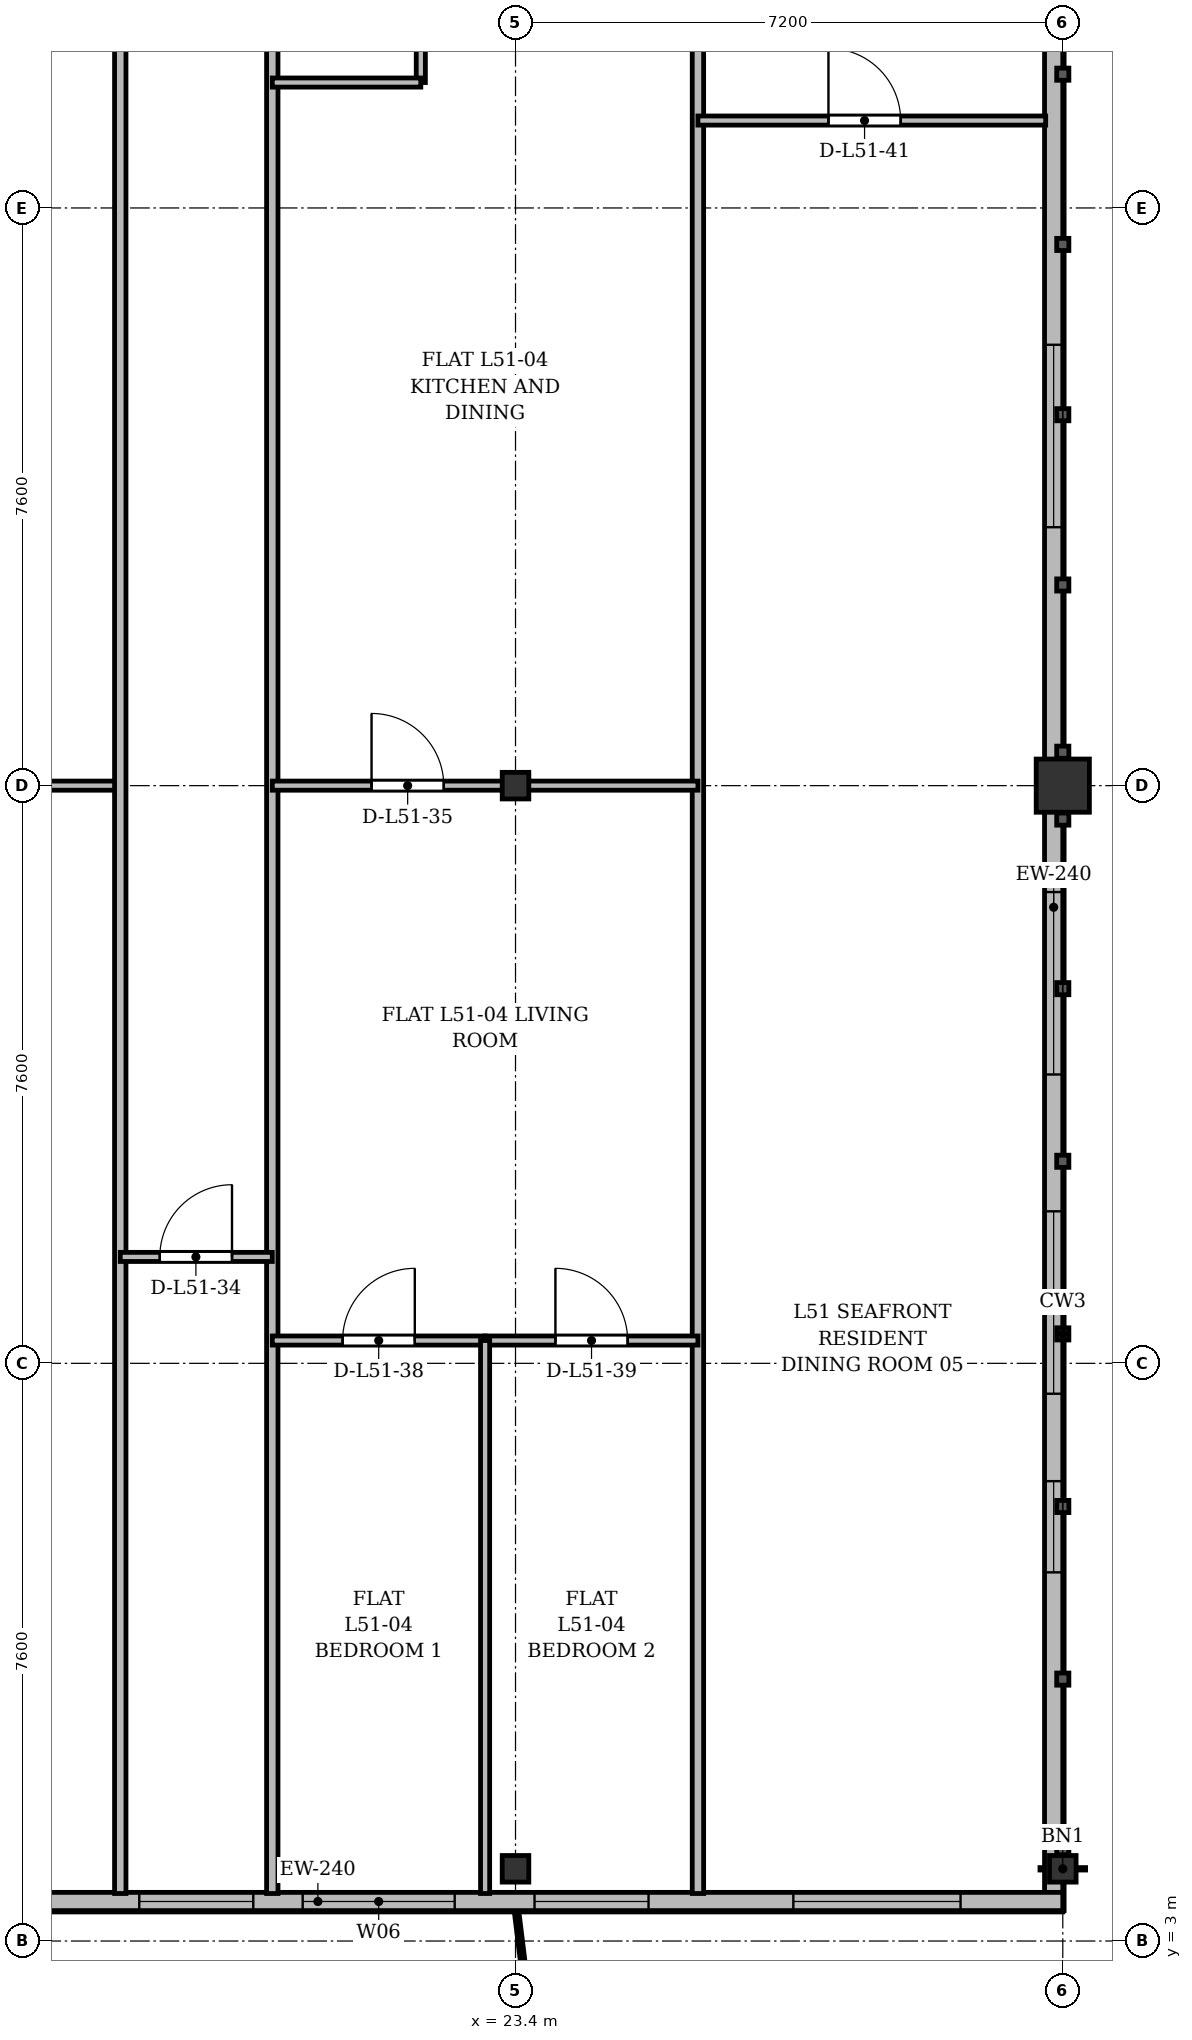
"""IFC4 building model, lengths in metres.
Left out: names, types, materials, properties, quantities, classifications, styles, units other than length and angle.
Written with IfcOpenShell. Run it as: python <this file> out.ifc"""

import sys

from ifc_helpers import new_model, si_unit, direction, frame, frame_2d, origin, origin_2d, place, context, subcontext, project, spatial, rectangle, i_section, extrude, source, transform, mapped, element, fill, save


model = new_model("IFC4")
c1 = context("Model", 3, precision=1e-05, world=origin(), true_north=direction((0.0, 1.0)))
c2 = subcontext(c1, "Body", "Model", "MODEL_VIEW")
j1 = project(units=[si_unit("LENGTHUNIT", "METRE"), si_unit("PLANEANGLEUNIT", "RADIAN")], contexts=[c1])
p1 = place(None, origin())
s1 = spatial("IfcSite", under=j1, at=p1, CompositionType="ELEMENT")
p2 = place(p1, origin())
s2 = spatial("IfcBuilding", under=s1, at=p2, CompositionType="ELEMENT")
p3 = place(p2, frame((0.0, 0.0, 197.7)))
s3 = spatial("IfcBuildingStorey", under=s2, at=p3, CompositionType="ELEMENT", Elevation=197.7)
m1 = source(origin(), c2, "Body", "SweptSolid", [
    extrude(i_section(OverallWidth=0.35, OverallDepth=0.35, WebThickness=0.018, FlangeThickness=0.028, at=origin_2d()), origin(), (0.0, 0.0, 1.0), 3.6),
])
for number, where, z_axis, x_axis in (
    (1, (23.4, 3.95, 0.0), (0.0, 0.0, 1.0), (1.0, 0.0, 0.0)),
    (2, (23.4, 18.2, 0.0), (0.0, 0.0, 1.0), (1.0, 0.0, 0.0)),
    (3, (30.6, 3.95, 0.0), (0.0, 0.0, 1.0), (1.0, 0.0, 0.0)),
):
    element("IfcColumn", number, at=place(p3, frame(where, z_axis=z_axis, x_axis=x_axis)), inside=s3, PredefinedType="COLUMN", context=c2, shape_type="MappedRepresentation", body=[
        mapped(m1, transform((0.0, 0.0, 0.0), x_axis=(1.0, 0.0, 0.0), y_axis=(0.0, 1.0, 0.0), z_axis=(0.0, 0.0, 1.0), scale=1.0)),
    ])
m2 = source(origin(), c2, "Body", "SweptSolid", [
    extrude(rectangle(XDim=0.7, YDim=0.7, at=origin_2d()), origin(), (0.0, 0.0, 1.0), 3.6),
])
p4 = place(p3, frame((30.6, 18.2, 0.0), z_axis=(0.0, 0.0, 1.0), x_axis=(1.0, 0.0, 0.0)))
e4 = element("IfcColumn", 4, at=p4, inside=s3, PredefinedType="COLUMN", context=c2, shape_type="MappedRepresentation", body=[
    mapped(m2, transform((0.0, 0.0, 0.0), x_axis=(1.0, 0.0, 0.0), y_axis=(0.0, 1.0, 0.0), z_axis=(0.0, 0.0, 1.0), scale=1.0)),
])
p5 = place(p3, frame((30.48, 29.8, 0.0), z_axis=(0.0, 0.0, 1.0), x_axis=(0.0, -1.0, 0.0)))
e5 = element("IfcWall", 5, at=p5, inside=s3, PredefinedType="SOLIDWALL", context=c2, shape_type="SweptSolid", body=[
    extrude(rectangle(XDim=26.4, YDim=0.24, at=frame_2d((13.2, 0.0))), origin(), (0.0, 0.0, 1.0), 2.86),
])
p6 = place(p5, frame((20.75, 0.0, 0.92)))
e6 = element("IfcOpeningElement", 6, at=p6, cuts=e5, PredefinedType="OPENING", context=c2, shape_type="SweptSolid", body=[
    extrude(rectangle(XDim=1.2, YDim=1.65, at=frame_2d((0.6, 0.825))), frame((0.0, 0.13, 0.0), z_axis=(0.0, -1.0, 0.0), x_axis=(1.0, 0.0, 0.0)), (0.0, 0.0, 1.0), 0.26),
])
p7 = place(p5, frame((17.2, 0.0, 0.92)))
e7 = element("IfcOpeningElement", 7, at=p7, cuts=e5, PredefinedType="OPENING", context=c2, shape_type="SweptSolid", body=[
    extrude(rectangle(XDim=2.4, YDim=1.84, at=frame_2d((1.2, 0.92))), frame((0.0, 0.13, 0.0), z_axis=(0.0, -1.0, 0.0), x_axis=(1.0, 0.0, 0.0)), (0.0, 0.0, 1.0), 0.26),
])
p8 = place(p5, frame((13.0, 0.0, 0.92)))
e8 = element("IfcOpeningElement", 8, at=p8, cuts=e5, PredefinedType="OPENING", context=c2, shape_type="SweptSolid", body=[
    extrude(rectangle(XDim=2.4, YDim=1.84, at=frame_2d((1.2, 0.92))), frame((0.0, 0.13, 0.0), z_axis=(0.0, -1.0, 0.0), x_axis=(1.0, 0.0, 0.0)), (0.0, 0.0, 1.0), 0.26),
])
p9 = place(p5, frame((5.8, 0.0, 0.92)))
e9 = element("IfcOpeningElement", 9, at=p9, cuts=e5, PredefinedType="OPENING", context=c2, shape_type="SweptSolid", body=[
    extrude(rectangle(XDim=2.4, YDim=1.84, at=frame_2d((1.2, 0.92))), frame((0.0, 0.13, 0.0), z_axis=(0.0, -1.0, 0.0), x_axis=(1.0, 0.0, 0.0)), (0.0, 0.0, 1.0), 0.26),
])
p10 = place(p3, frame((30.6, 3.52, 0.0), z_axis=(0.0, 0.0, 1.0), x_axis=(-1.0, 0.0, 0.0)))
e10 = element("IfcWall", 10, at=p10, inside=s3, PredefinedType="SOLIDWALL", context=c2, shape_type="SweptSolid", body=[
    extrude(rectangle(XDim=19.6, YDim=0.24, at=frame_2d((9.8, 0.0))), origin(), (0.0, 0.0, 1.0), 3.36),
])
p11 = place(p10, frame((1.345, 0.0, 0.9)))
e11 = element("IfcOpeningElement", 11, at=p11, cuts=e10, PredefinedType="OPENING", context=c2, shape_type="SweptSolid", body=[
    extrude(rectangle(XDim=2.2, YDim=1.8, at=frame_2d((1.1, 0.9))), frame((0.0, 0.13, 0.0), z_axis=(0.0, -1.0, 0.0), x_axis=(1.0, 0.0, 0.0)), (0.0, 0.0, 1.0), 0.26),
])
p12 = place(p10, frame((5.45, 0.0, 0.9)))
e12 = element("IfcOpeningElement", 12, at=p12, cuts=e10, PredefinedType="OPENING", context=c2, shape_type="SweptSolid", body=[
    extrude(rectangle(XDim=1.5, YDim=1.75, at=frame_2d((0.75, 0.875))), frame((0.0, 0.13, 0.0), z_axis=(0.0, -1.0, 0.0), x_axis=(1.0, 0.0, 0.0)), (0.0, 0.0, 1.0), 0.26),
])
p13 = place(p10, frame((8.0, 0.0, 0.9)))
e13 = element("IfcOpeningElement", 13, at=p13, cuts=e10, PredefinedType="OPENING", context=c2, shape_type="SweptSolid", body=[
    extrude(rectangle(XDim=2.0, YDim=1.95, at=frame_2d((1.0, 0.975))), frame((0.0, 0.13, 0.0), z_axis=(0.0, -1.0, 0.0), x_axis=(1.0, 0.0, 0.0)), (0.0, 0.0, 1.0), 0.26),
])
p14 = place(p10, frame((10.65, 0.0, 0.9)))
e14 = element("IfcOpeningElement", 14, at=p14, cuts=e10, PredefinedType="OPENING", context=c2, shape_type="SweptSolid", body=[
    extrude(rectangle(XDim=1.5, YDim=1.75, at=frame_2d((0.75, 0.875))), frame((0.0, 0.13, 0.0), z_axis=(0.0, -1.0, 0.0), x_axis=(1.0, 0.0, 0.0)), (0.0, 0.0, 1.0), 0.26),
])
p15 = place(p10, frame((14.3, 0.0, 0.9)))
e15 = element("IfcOpeningElement", 15, at=p15, cuts=e10, PredefinedType="OPENING", context=c2, shape_type="SweptSolid", body=[
    extrude(rectangle(XDim=1.8, YDim=1.8, at=frame_2d((0.9, 0.9))), frame((0.0, 0.13, 0.0), z_axis=(0.0, -1.0, 0.0), x_axis=(1.0, 0.0, 0.0)), (0.0, 0.0, 1.0), 0.26),
])
p16 = place(p10, frame((18.305, 0.0, 0.9)))
e16 = element("IfcOpeningElement", 16, at=p16, cuts=e10, PredefinedType="OPENING", context=c2, shape_type="SweptSolid", body=[
    extrude(rectangle(XDim=0.9, YDim=1.65, at=frame_2d((0.45, 0.825))), frame((0.0, 0.13, 0.0), z_axis=(0.0, -1.0, 0.0), x_axis=(1.0, 0.0, 0.0)), (0.0, 0.0, 1.0), 0.26),
])
p17 = place(p3, frame((25.8, 3.625, 0.0), z_axis=(0.0, 0.0, 1.0), x_axis=(0.0, 1.0, 0.0)))
e17 = element("IfcWall", 17, at=p17, inside=s3, PredefinedType="PARTITIONING", context=c2, shape_type="SweptSolid", body=[
    extrude(rectangle(XDim=27.175, YDim=0.15, at=frame_2d((13.587, 0.0))), origin(), (0.0, 0.0, 1.0), 2.91),
])
p18 = place(p3, frame((12.6, 18.2, 0.0), z_axis=(0.0, 0.0, 1.0), x_axis=(1.0, 0.0, 0.0)))
e18 = element("IfcWall", 18, at=p18, inside=s3, PredefinedType="PARTITIONING", context=c2, shape_type="SweptSolid", body=[
    extrude(rectangle(XDim=5.6, YDim=0.12, at=frame_2d((2.8, 0.0))), origin(), (0.0, 0.0, 1.0), 2.91),
])
p19 = place(p18, frame((0.936, 0.0, 0.0)))
e19 = element("IfcOpeningElement", 19, at=p19, cuts=e18, PredefinedType="OPENING", context=c2, shape_type="SweptSolid", body=[
    extrude(rectangle(XDim=0.95, YDim=2.15, at=frame_2d((0.475, 1.075))), frame((0.0, 0.07, 0.0), z_axis=(0.0, -1.0, 0.0), x_axis=(1.0, 0.0, 0.0)), (0.0, 0.0, 1.0), 0.14),
])
for number, where, z_axis, x_axis in (
    (20, (18.2, 3.625, 0.0), (0.0, 0.0, 1.0), (0.0, 1.0, 0.0)),
    (21, (20.2, 3.625, 0.0), (0.0, 0.0, 1.0), (0.0, 1.0, 0.0)),
):
    element("IfcWall", number, at=place(p3, frame(where, z_axis=z_axis, x_axis=x_axis)), inside=s3, PredefinedType="PARTITIONING", context=c2, shape_type="SweptSolid", body=[
        extrude(rectangle(XDim=27.175, YDim=0.15, at=frame_2d((13.587, 0.0))), origin(), (0.0, 0.0, 1.0), 2.91),
    ])
p20 = place(p3, frame((18.2, 12.0, 0.0), z_axis=(0.0, 0.0, 1.0), x_axis=(1.0, 0.0, 0.0)))
e22 = element("IfcWall", 22, at=p20, inside=s3, PredefinedType="PARTITIONING", context=c2, shape_type="SweptSolid", body=[
    extrude(rectangle(XDim=2.0, YDim=0.12, at=frame_2d((1.0, 0.0))), origin(), (0.0, 0.0, 1.0), 3.36),
])
p21 = place(p20, frame((0.52, 0.0, 0.0)))
e23 = element("IfcOpeningElement", 23, at=p21, cuts=e22, PredefinedType="OPENING", context=c2, shape_type="SweptSolid", body=[
    extrude(rectangle(XDim=0.95, YDim=2.15, at=frame_2d((0.475, 1.075))), frame((0.0, 0.07, 0.0), z_axis=(0.0, -1.0, 0.0), x_axis=(1.0, 0.0, 0.0)), (0.0, 0.0, 1.0), 0.14),
])
p22 = place(p3, frame((20.2, 18.2, 0.0), z_axis=(0.0, 0.0, 1.0), x_axis=(1.0, 0.0, 0.0)))
e24 = element("IfcWall", 24, at=p22, inside=s3, PredefinedType="PARTITIONING", context=c2, shape_type="SweptSolid", body=[
    extrude(rectangle(XDim=5.6, YDim=0.12, at=frame_2d((2.8, 0.0))), origin(), (0.0, 0.0, 1.0), 2.91),
])
p23 = place(p22, frame((1.306, 0.0, 0.0)))
e25 = element("IfcOpeningElement", 25, at=p23, cuts=e24, PredefinedType="OPENING", context=c2, shape_type="SweptSolid", body=[
    extrude(rectangle(XDim=0.95, YDim=2.15, at=frame_2d((0.475, 1.075))), frame((0.0, 0.07, 0.0), z_axis=(0.0, -1.0, 0.0), x_axis=(1.0, 0.0, 0.0)), (0.0, 0.0, 1.0), 0.14),
])
p24 = place(p3, frame((22.154, 27.45, 0.0), z_axis=(0.0, 0.0, 1.0), x_axis=(0.0, 1.0, 0.0)))
e26 = element("IfcWall", 26, at=p24, inside=s3, PredefinedType="PARTITIONING", context=c2, shape_type="SweptSolid", body=[
    extrude(rectangle(XDim=3.35, YDim=0.12, at=frame_2d((1.675, 0.0))), origin(), (0.0, 0.0, 1.0), 3.36),
])
p25 = place(p24, frame((0.8, 0.0, 0.0)))
e27 = element("IfcOpeningElement", 27, at=p25, cuts=e26, PredefinedType="OPENING", context=c2, shape_type="SweptSolid", body=[
    extrude(rectangle(XDim=0.85, YDim=2.1, at=frame_2d((0.425, 1.05))), frame((0.0, 0.07, 0.0), z_axis=(0.0, -1.0, 0.0), x_axis=(1.0, 0.0, 0.0)), (0.0, 0.0, 1.0), 0.14),
])
p26 = place(p3, frame((20.2, 27.45, 0.0), z_axis=(0.0, 0.0, 1.0), x_axis=(1.0, 0.0, 0.0)))
e28 = element("IfcWall", 28, at=p26, inside=s3, PredefinedType="PARTITIONING", context=c2, shape_type="SweptSolid", body=[
    extrude(rectangle(XDim=1.954, YDim=0.12, at=frame_2d((0.977, 0.0))), origin(), (0.0, 0.0, 1.0), 3.36),
])
p27 = place(p3, frame((20.2, 10.9, 0.0), z_axis=(0.0, 0.0, 1.0), x_axis=(1.0, 0.0, 0.0)))
e29 = element("IfcWall", 29, at=p27, inside=s3, PredefinedType="PARTITIONING", context=c2, shape_type="SweptSolid", body=[
    extrude(rectangle(XDim=2.8, YDim=0.12, at=frame_2d((1.4, 0.0))), origin(), (0.0, 0.0, 1.0), 3.06),
])
p28 = place(p27, frame((0.925, 0.0, 0.0)))
e30 = element("IfcOpeningElement", 30, at=p28, cuts=e29, PredefinedType="OPENING", context=c2, shape_type="SweptSolid", body=[
    extrude(rectangle(XDim=0.95, YDim=2.15, at=frame_2d((0.475, 1.075))), frame((0.0, 0.07, 0.0), z_axis=(0.0, -1.0, 0.0), x_axis=(1.0, 0.0, 0.0)), (0.0, 0.0, 1.0), 0.14),
])
p29 = place(p3, frame((23.0, 10.9, 0.0), z_axis=(0.0, 0.0, 1.0), x_axis=(1.0, 0.0, 0.0)))
e31 = element("IfcWall", 31, at=p29, inside=s3, PredefinedType="PARTITIONING", context=c2, shape_type="SweptSolid", body=[
    extrude(rectangle(XDim=2.8, YDim=0.12, at=frame_2d((1.4, 0.0))), origin(), (0.0, 0.0, 1.0), 2.86),
])
p30 = place(p29, frame((0.925, 0.0, 0.0)))
e32 = element("IfcOpeningElement", 32, at=p30, cuts=e31, PredefinedType="OPENING", context=c2, shape_type="SweptSolid", body=[
    extrude(rectangle(XDim=0.95, YDim=2.15, at=frame_2d((0.475, 1.075))), frame((0.0, 0.07, 0.0), z_axis=(0.0, -1.0, 0.0), x_axis=(1.0, 0.0, 0.0)), (0.0, 0.0, 1.0), 0.14),
])
p31 = place(p3, frame((23.0, 3.625, 0.0), z_axis=(0.0, 0.0, 1.0), x_axis=(0.0, 1.0, 0.0)))
e33 = element("IfcWall", 33, at=p31, inside=s3, PredefinedType="PARTITIONING", context=c2, shape_type="SweptSolid", body=[
    extrude(rectangle(XDim=7.275, YDim=0.12, at=frame_2d((3.637, 0.0))), origin(), (0.0, 0.0, 1.0), 2.91),
])
p32 = place(p3, frame((25.8, 26.95, 0.0), z_axis=(0.0, 0.0, 1.0), x_axis=(1.0, 0.0, 0.0)))
e34 = element("IfcWall", 34, at=p32, inside=s3, PredefinedType="PARTITIONING", context=c2, shape_type="SweptSolid", body=[
    extrude(rectangle(XDim=4.575, YDim=0.12, at=frame_2d((2.288, 0.0))), origin(), (0.0, 0.0, 1.0), 3.36),
])
p33 = place(p32, frame((1.717, 0.0, 0.0)))
e35 = element("IfcOpeningElement", 35, at=p33, cuts=e34, PredefinedType="OPENING", context=c2, shape_type="SweptSolid", body=[
    extrude(rectangle(XDim=0.95, YDim=2.15, at=frame_2d((0.475, 1.075))), frame((0.0, 0.07, 0.0), z_axis=(0.0, -1.0, 0.0), x_axis=(1.0, 0.0, 0.0)), (0.0, 0.0, 1.0), 0.14),
])
m3 = source(origin(), c2, "Body", "SweptSolid", [
    extrude(rectangle(XDim=1.2, YDim=1.65, at=frame_2d((0.6, 0.825))), frame((0.0, 0.03, 0.0), z_axis=(0.0, -1.0, 0.0), x_axis=(1.0, 0.0, 0.0)), (0.0, 0.0, 1.0), 0.06),
])
p34 = place(p6, origin())
e36 = element("IfcWindow", 36, at=p34, inside=s3, PartitioningType="SINGLE_PANEL", PredefinedType="WINDOW", context=c2, shape_type="MappedRepresentation", body=[
    mapped(m3, transform((0.0, 0.0, 0.0), x_axis=(1.0, 0.0, 0.0), y_axis=(0.0, 1.0, 0.0), z_axis=(0.0, 0.0, 1.0), scale=1.0)),
])
fill(e6, e36)
m4 = source(origin(), c2, "Body", "SweptSolid", [
    extrude(rectangle(XDim=2.4, YDim=1.84, at=frame_2d((1.2, 0.92))), frame((0.0, 0.03, 0.0), z_axis=(0.0, -1.0, 0.0), x_axis=(1.0, 0.0, 0.0)), (0.0, 0.0, 1.0), 0.06),
])
p35 = place(p7, origin())
e37 = element("IfcWindow", 37, at=p35, inside=s3, PartitioningType="SINGLE_PANEL", PredefinedType="WINDOW", context=c2, shape_type="MappedRepresentation", body=[
    mapped(m4, transform((0.0, 0.0, 0.0), x_axis=(1.0, 0.0, 0.0), y_axis=(0.0, 1.0, 0.0), z_axis=(0.0, 0.0, 1.0), scale=1.0)),
])
fill(e7, e37)
p36 = place(p8, origin())
e38 = element("IfcWindow", 38, at=p36, inside=s3, PartitioningType="SINGLE_PANEL", PredefinedType="WINDOW", context=c2, shape_type="MappedRepresentation", body=[
    mapped(m4, transform((0.0, 0.0, 0.0), x_axis=(1.0, 0.0, 0.0), y_axis=(0.0, 1.0, 0.0), z_axis=(0.0, 0.0, 1.0), scale=1.0)),
])
fill(e8, e38)
p37 = place(p9, origin())
e39 = element("IfcWindow", 39, at=p37, inside=s3, PartitioningType="SINGLE_PANEL", PredefinedType="WINDOW", context=c2, shape_type="MappedRepresentation", body=[
    mapped(m4, transform((0.0, 0.0, 0.0), x_axis=(1.0, 0.0, 0.0), y_axis=(0.0, 1.0, 0.0), z_axis=(0.0, 0.0, 1.0), scale=1.0)),
])
fill(e9, e39)
m5 = source(origin(), c2, "Body", "SweptSolid", [
    extrude(rectangle(XDim=2.2, YDim=1.8, at=frame_2d((1.1, 0.9))), frame((0.0, 0.03, 0.0), z_axis=(0.0, -1.0, 0.0), x_axis=(1.0, 0.0, 0.0)), (0.0, 0.0, 1.0), 0.06),
])
p38 = place(p11, origin())
e40 = element("IfcWindow", 40, at=p38, inside=s3, PartitioningType="SINGLE_PANEL", PredefinedType="WINDOW", context=c2, shape_type="MappedRepresentation", body=[
    mapped(m5, transform((0.0, 0.0, 0.0), x_axis=(1.0, 0.0, 0.0), y_axis=(0.0, 1.0, 0.0), z_axis=(0.0, 0.0, 1.0), scale=1.0)),
])
fill(e11, e40)
m6 = source(origin(), c2, "Body", "SweptSolid", [
    extrude(rectangle(XDim=1.5, YDim=1.75, at=frame_2d((0.75, 0.875))), frame((0.0, 0.03, 0.0), z_axis=(0.0, -1.0, 0.0), x_axis=(1.0, 0.0, 0.0)), (0.0, 0.0, 1.0), 0.06),
])
p39 = place(p12, origin())
e41 = element("IfcWindow", 41, at=p39, inside=s3, PartitioningType="SINGLE_PANEL", PredefinedType="WINDOW", context=c2, shape_type="MappedRepresentation", body=[
    mapped(m6, transform((0.0, 0.0, 0.0), x_axis=(1.0, 0.0, 0.0), y_axis=(0.0, 1.0, 0.0), z_axis=(0.0, 0.0, 1.0), scale=1.0)),
])
fill(e12, e41)
m7 = source(origin(), c2, "Body", "SweptSolid", [
    extrude(rectangle(XDim=2.0, YDim=1.95, at=frame_2d((1.0, 0.975))), frame((0.0, 0.03, 0.0), z_axis=(0.0, -1.0, 0.0), x_axis=(1.0, 0.0, 0.0)), (0.0, 0.0, 1.0), 0.06),
])
p40 = place(p13, origin())
e42 = element("IfcWindow", 42, at=p40, inside=s3, PartitioningType="SINGLE_PANEL", PredefinedType="WINDOW", context=c2, shape_type="MappedRepresentation", body=[
    mapped(m7, transform((0.0, 0.0, 0.0), x_axis=(1.0, 0.0, 0.0), y_axis=(0.0, 1.0, 0.0), z_axis=(0.0, 0.0, 1.0), scale=1.0)),
])
fill(e13, e42)
p41 = place(p14, origin())
e43 = element("IfcWindow", 43, at=p41, inside=s3, PartitioningType="SINGLE_PANEL", PredefinedType="WINDOW", context=c2, shape_type="MappedRepresentation", body=[
    mapped(m6, transform((0.0, 0.0, 0.0), x_axis=(1.0, 0.0, 0.0), y_axis=(0.0, 1.0, 0.0), z_axis=(0.0, 0.0, 1.0), scale=1.0)),
])
fill(e14, e43)
m8 = source(origin(), c2, "Body", "SweptSolid", [
    extrude(rectangle(XDim=0.95, YDim=2.15, at=frame_2d((0.475, 1.075))), frame((0.0, 0.025, 0.0), z_axis=(0.0, -1.0, 0.0), x_axis=(1.0, 0.0, 0.0)), (0.0, 0.0, 1.0), 0.05),
])
p42 = place(p21, origin())
e44 = element("IfcDoor", 44, at=p42, inside=s3, OperationType="SINGLE_SWING_RIGHT", PredefinedType="DOOR", context=c2, shape_type="MappedRepresentation", body=[
    mapped(m8, transform((0.0, 0.0, 0.0), x_axis=(1.0, 0.0, 0.0), y_axis=(0.0, 1.0, 0.0), z_axis=(0.0, 0.0, 1.0), scale=1.0)),
])
fill(e23, e44)
p43 = place(p23, origin())
e45 = element("IfcDoor", 45, at=p43, inside=s3, OperationType="SINGLE_SWING_LEFT", PredefinedType="DOOR", context=c2, shape_type="MappedRepresentation", body=[
    mapped(m8, transform((0.0, 0.0, 0.0), x_axis=(1.0, 0.0, 0.0), y_axis=(0.0, 1.0, 0.0), z_axis=(0.0, 0.0, 1.0), scale=1.0)),
])
fill(e25, e45)
p44 = place(p28, origin())
e46 = element("IfcDoor", 46, at=p44, inside=s3, OperationType="SINGLE_SWING_RIGHT", PredefinedType="DOOR", context=c2, shape_type="MappedRepresentation", body=[
    mapped(m8, transform((0.0, 0.0, 0.0), x_axis=(1.0, 0.0, 0.0), y_axis=(0.0, 1.0, 0.0), z_axis=(0.0, 0.0, 1.0), scale=1.0)),
])
fill(e30, e46)
p45 = place(p30, origin())
e47 = element("IfcDoor", 47, at=p45, inside=s3, OperationType="SINGLE_SWING_LEFT", PredefinedType="DOOR", context=c2, shape_type="MappedRepresentation", body=[
    mapped(m8, transform((0.0, 0.0, 0.0), x_axis=(1.0, 0.0, 0.0), y_axis=(0.0, 1.0, 0.0), z_axis=(0.0, 0.0, 1.0), scale=1.0)),
])
fill(e32, e47)
p46 = place(p33, origin())
e48 = element("IfcDoor", 48, at=p46, inside=s3, OperationType="SINGLE_SWING_LEFT", PredefinedType="DOOR", context=c2, shape_type="MappedRepresentation", body=[
    mapped(m8, transform((0.0, 0.0, 0.0), x_axis=(1.0, 0.0, 0.0), y_axis=(0.0, 1.0, 0.0), z_axis=(0.0, 0.0, 1.0), scale=1.0)),
])
fill(e35, e48)
save(model, sys.argv[1])
